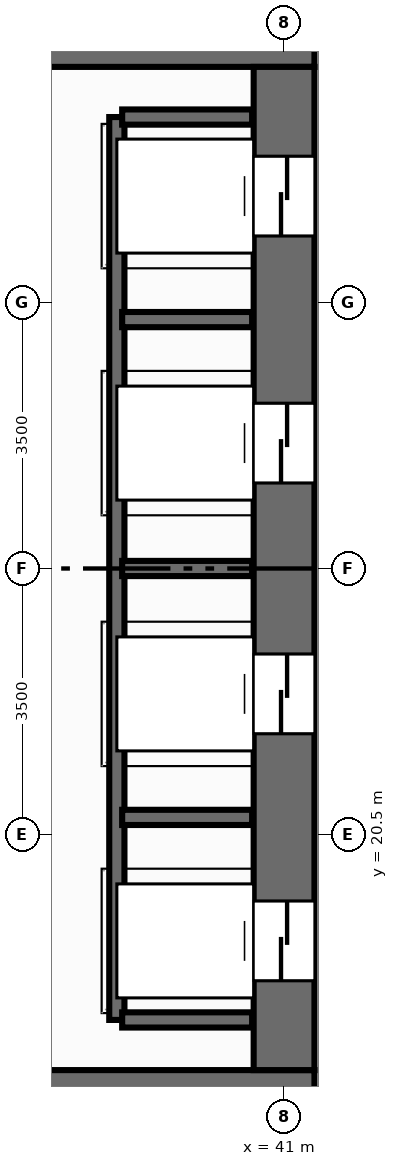
"""IFC4 building model, lengths in metres.
Left out: names, types, materials, properties, quantities, classifications, styles, units other than length and angle.
Written with IfcOpenShell. Run it as: python <this file> out.ifc"""

import sys

from ifc_helpers import new_model, si_unit, direction, frame, frame_2d, origin, place, context, subcontext, project, spatial, rectangle, extrude, element, fill, save


model = new_model("IFC4")
c1 = context("Model", 3, precision=1e-05, world=origin(), true_north=direction((0.0, 1.0)))
c2 = subcontext(c1, "Body", "Model", "MODEL_VIEW")
j1 = project(units=[si_unit("LENGTHUNIT", "METRE"), si_unit("PLANEANGLEUNIT", "RADIAN")], contexts=[c1])
p1 = place(None, origin())
s1 = spatial("IfcSite", under=j1, at=p1, CompositionType="ELEMENT")
p2 = place(p1, origin())
s2 = spatial("IfcBuilding", under=s1, at=p2, CompositionType="ELEMENT")
p3 = place(p2, frame((0.0, 0.0, 47.2)))
s3 = spatial("IfcBuildingStorey", under=s2, at=p3, CompositionType="ELEMENT", Elevation=47.2)
p4 = place(p3, frame((22.6, 17.0, 0.0), z_axis=(0.0, 0.0, 1.0), x_axis=(1.0, 0.0, 0.0)))
e1 = element("IfcWall", 1, at=p4, inside=s3, PredefinedType="SHEAR", context=c2, shape_type="SweptSolid", body=[
    extrude(rectangle(XDim=18.8, YDim=0.8, at=frame_2d((9.4, 0.0))), origin(), (0.0, 0.0, 1.0), 3.2),
])
p5 = place(p4, frame((5.9, 0.0, 0.0)))
e2 = element("IfcOpeningElement", 2, at=p5, cuts=e1, PredefinedType="OPENING", context=c2, shape_type="SweptSolid", body=[
    extrude(rectangle(XDim=1.1, YDim=2.15, at=frame_2d((0.55, 1.075))), frame((0.0, 0.41, 0.0), z_axis=(0.0, -1.0, 0.0), x_axis=(1.0, 0.0, 0.0)), (0.0, 0.0, 1.0), 0.82),
])
p6 = place(p4, frame((9.45, 0.0, 0.0)))
e3 = element("IfcOpeningElement", 3, at=p6, cuts=e1, PredefinedType="OPENING", context=c2, shape_type="SweptSolid", body=[
    extrude(rectangle(XDim=0.9, YDim=2.1, at=frame_2d((0.45, 1.05))), frame((0.0, 0.41, 0.0), z_axis=(0.0, -1.0, 0.0), x_axis=(1.0, 0.0, 0.0)), (0.0, 0.0, 1.0), 0.82),
])
p7 = place(p3, frame((22.6, 31.0, 0.0), z_axis=(0.0, 0.0, 1.0), x_axis=(1.0, 0.0, 0.0)))
e4 = element("IfcWall", 4, at=p7, inside=s3, PredefinedType="SHEAR", context=c2, shape_type="SweptSolid", body=[
    extrude(rectangle(XDim=18.8, YDim=0.8, at=frame_2d((9.4, 0.0))), origin(), (0.0, 0.0, 1.0), 3.2),
])
p8 = place(p7, frame((11.8, 0.0, 0.0)))
e5 = element("IfcOpeningElement", 5, at=p8, cuts=e4, PredefinedType="OPENING", context=c2, shape_type="SweptSolid", body=[
    extrude(rectangle(XDim=1.1, YDim=2.15, at=frame_2d((0.55, 1.075))), frame((0.0, 0.41, 0.0), z_axis=(0.0, -1.0, 0.0), x_axis=(1.0, 0.0, 0.0)), (0.0, 0.0, 1.0), 0.82),
])
p9 = place(p3, frame((41.0, 17.4, 0.0), z_axis=(0.0, 0.0, 1.0), x_axis=(0.0, 1.0, 0.0)))
e6 = element("IfcWall", 6, at=p9, inside=s3, PredefinedType="SHEAR", context=c2, shape_type="SweptSolid", body=[
    extrude(rectangle(XDim=13.2, YDim=0.8, at=frame_2d((6.6, 0.0))), origin(), (0.0, 0.0, 1.0), 3.2),
])
p10 = place(p9, frame((1.175, 0.0, 0.0)))
e7 = element("IfcOpeningElement", 7, at=p10, cuts=e6, PredefinedType="OPENING", context=c2, shape_type="SweptSolid", body=[
    extrude(rectangle(XDim=1.05, YDim=2.15, at=frame_2d((0.525, 1.075))), frame((0.0, 0.41, 0.0), z_axis=(0.0, -1.0, 0.0), x_axis=(1.0, 0.0, 0.0)), (0.0, 0.0, 1.0), 0.82),
])
p11 = place(p9, frame((4.425, 0.0, 0.0)))
e8 = element("IfcOpeningElement", 8, at=p11, cuts=e6, PredefinedType="OPENING", context=c2, shape_type="SweptSolid", body=[
    extrude(rectangle(XDim=1.05, YDim=2.15, at=frame_2d((0.525, 1.075))), frame((0.0, 0.41, 0.0), z_axis=(0.0, -1.0, 0.0), x_axis=(1.0, 0.0, 0.0)), (0.0, 0.0, 1.0), 0.82),
])
p12 = place(p9, frame((7.725, 0.0, 0.0)))
e9 = element("IfcOpeningElement", 9, at=p12, cuts=e6, PredefinedType="OPENING", context=c2, shape_type="SweptSolid", body=[
    extrude(rectangle(XDim=1.05, YDim=2.15, at=frame_2d((0.525, 1.075))), frame((0.0, 0.41, 0.0), z_axis=(0.0, -1.0, 0.0), x_axis=(1.0, 0.0, 0.0)), (0.0, 0.0, 1.0), 0.82),
])
p13 = place(p9, frame((10.975, 0.0, 0.0)))
e10 = element("IfcOpeningElement", 10, at=p13, cuts=e6, PredefinedType="OPENING", context=c2, shape_type="SweptSolid", body=[
    extrude(rectangle(XDim=1.05, YDim=2.15, at=frame_2d((0.525, 1.075))), frame((0.0, 0.41, 0.0), z_axis=(0.0, -1.0, 0.0), x_axis=(1.0, 0.0, 0.0)), (0.0, 0.0, 1.0), 0.82),
])
p14 = place(p3, frame((38.8, 18.06, 0.0), z_axis=(0.0, 0.0, 1.0), x_axis=(0.0, 1.0, 0.0)))
e11 = element("IfcWall", 11, at=p14, inside=s3, PredefinedType="SHEAR", context=c2, shape_type="SweptSolid", body=[
    extrude(rectangle(XDim=11.88, YDim=0.2, at=frame_2d((5.94, 0.0))), origin(), (0.0, 0.0, 1.0), 3.2),
])
for number, where, z_axis, x_axis in (
    (12, (38.87, 18.06, 0.0), (0.0, 0.0, 1.0), (1.0, 0.0, 0.0)),
    (13, (38.87, 29.94, 0.0), (0.0, 0.0, 1.0), (1.0, 0.0, 0.0)),
    (14, (38.87, 20.725, 0.0), (0.0, 0.0, 1.0), (1.0, 0.0, 0.0)),
    (15, (38.87, 24.0, 0.0), (0.0, 0.0, 1.0), (1.0, 0.0, 0.0)),
    (16, (38.87, 27.275, 0.0), (0.0, 0.0, 1.0), (1.0, 0.0, 0.0)),
):
    element("IfcWall", number, at=place(p3, frame(where, z_axis=z_axis, x_axis=x_axis)), inside=s3, PredefinedType="SHEAR", context=c2, shape_type="SweptSolid", body=[
        extrude(rectangle(XDim=1.71, YDim=0.2, at=frame_2d((0.855, 0.0))), origin(), (0.0, 0.0, 1.0), 3.2),
    ])
p15 = place(p10, origin())
e17 = element("IfcDoor", 17, at=p15, inside=s3, OperationType="DOUBLE_DOOR_SLIDING", PredefinedType="DOOR", context=c2, shape_type="SweptSolid", body=[
    extrude(rectangle(XDim=1.05, YDim=2.15, at=frame_2d((0.525, 1.075))), frame((0.0, 0.025, 0.0), z_axis=(0.0, -1.0, 0.0), x_axis=(1.0, 0.0, 0.0)), (0.0, 0.0, 1.0), 0.05),
])
fill(e7, e17)
p16 = place(p11, origin())
e18 = element("IfcDoor", 18, at=p16, inside=s3, OperationType="DOUBLE_DOOR_SLIDING", PredefinedType="DOOR", context=c2, shape_type="SweptSolid", body=[
    extrude(rectangle(XDim=1.05, YDim=2.15, at=frame_2d((0.525, 1.075))), frame((0.0, 0.025, 0.0), z_axis=(0.0, -1.0, 0.0), x_axis=(1.0, 0.0, 0.0)), (0.0, 0.0, 1.0), 0.05),
])
fill(e8, e18)
p17 = place(p12, origin())
e19 = element("IfcDoor", 19, at=p17, inside=s3, OperationType="DOUBLE_DOOR_SLIDING", PredefinedType="DOOR", context=c2, shape_type="SweptSolid", body=[
    extrude(rectangle(XDim=1.05, YDim=2.15, at=frame_2d((0.525, 1.075))), frame((0.0, 0.025, 0.0), z_axis=(0.0, -1.0, 0.0), x_axis=(1.0, 0.0, 0.0)), (0.0, 0.0, 1.0), 0.05),
])
fill(e9, e19)
p18 = place(p13, origin())
e20 = element("IfcDoor", 20, at=p18, inside=s3, OperationType="DOUBLE_DOOR_SLIDING", PredefinedType="DOOR", context=c2, shape_type="SweptSolid", body=[
    extrude(rectangle(XDim=1.05, YDim=2.15, at=frame_2d((0.525, 1.075))), frame((0.0, 0.025, 0.0), z_axis=(0.0, -1.0, 0.0), x_axis=(1.0, 0.0, 0.0)), (0.0, 0.0, 1.0), 0.05),
])
fill(e10, e20)
save(model, sys.argv[1])
